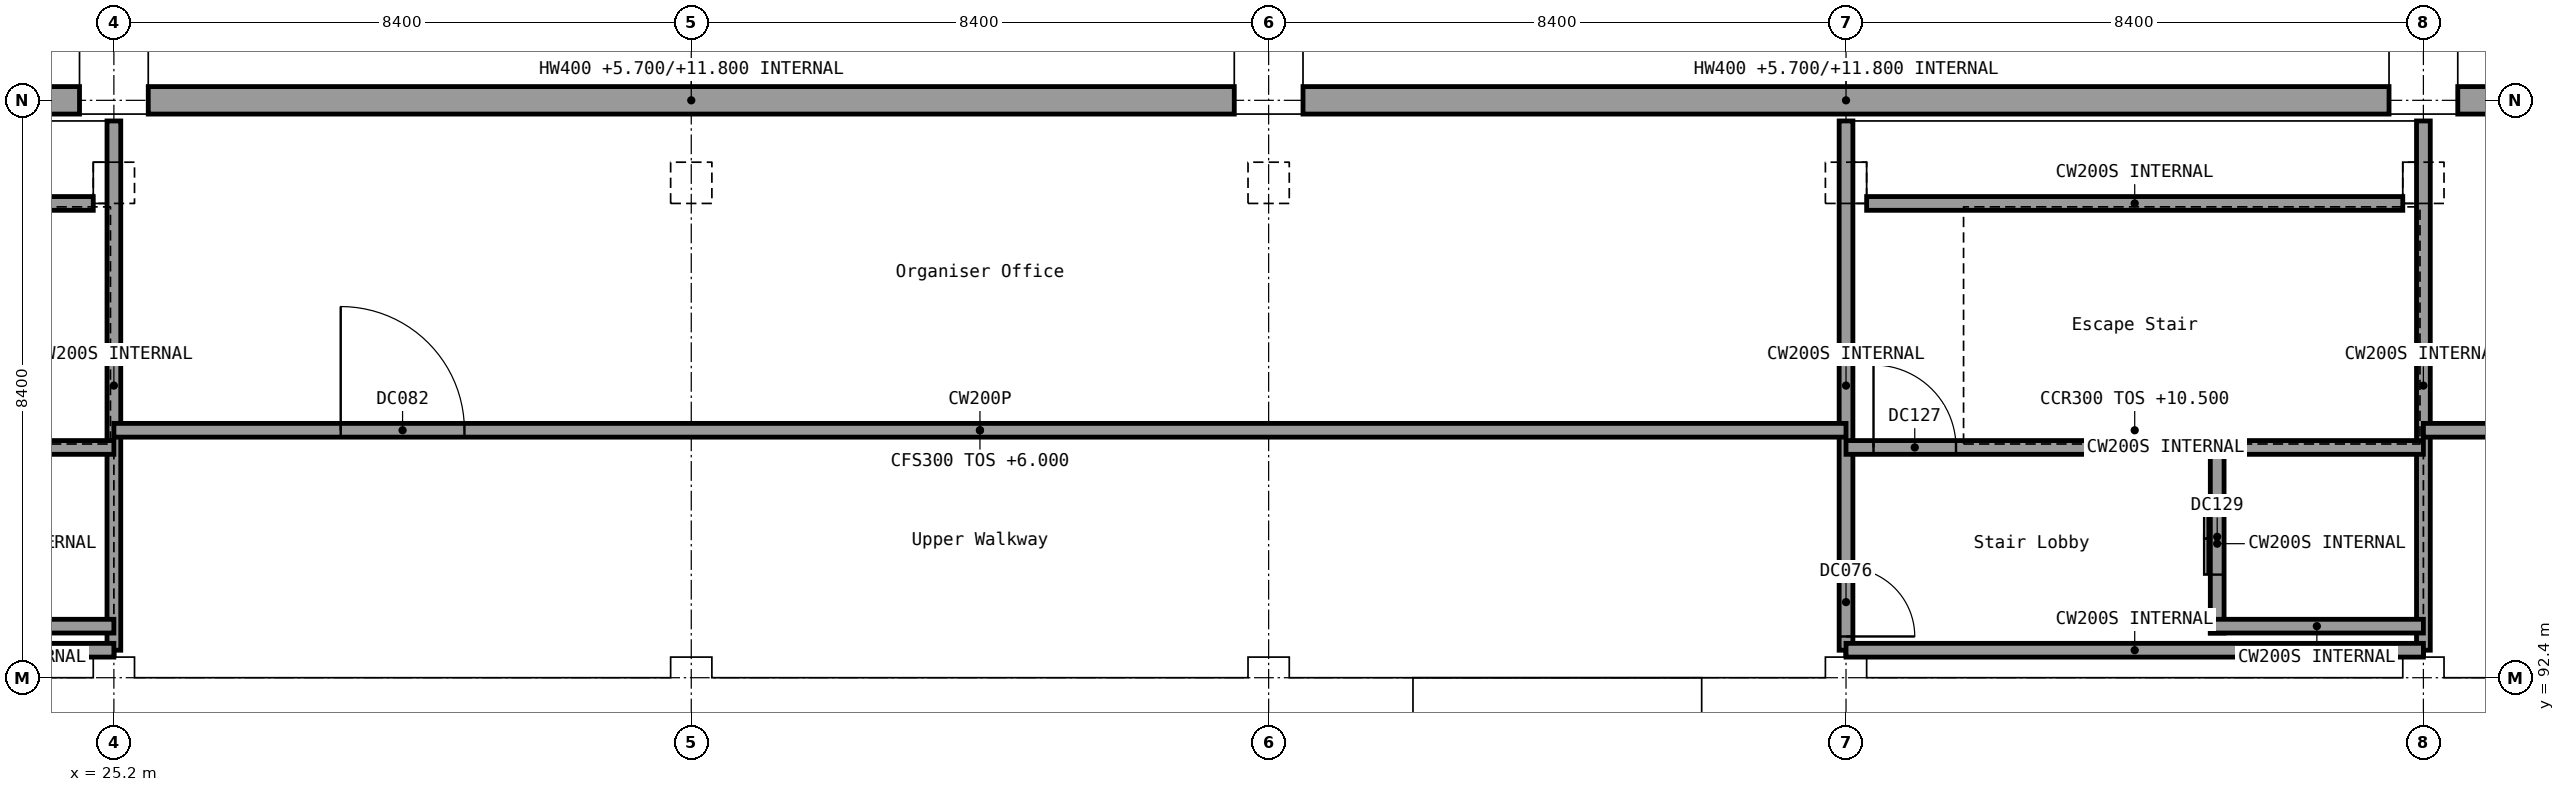
"""IFC4 building model, lengths in metres.
Left out: names, types, materials, properties, quantities, classifications, styles, units other than length and angle.
Written with IfcOpenShell. Run it as: python <this file> out.ifc"""

import sys

from ifc_helpers import new_model, si_unit, direction, frame, frame_2d, origin, origin_2d, place, context, subcontext, project, spatial, rectangle, extrude, element, fill, save


model = new_model("IFC4")
c1 = context("Model", 3, precision=1e-05, world=origin(), true_north=direction((0.0, 1.0)))
c2 = subcontext(c1, "Body", "Model", "MODEL_VIEW")
j1 = project(units=[si_unit("LENGTHUNIT", "METRE"), si_unit("PLANEANGLEUNIT", "RADIAN")], contexts=[c1])
p1 = place(None, origin())
s1 = spatial("IfcSite", under=j1, at=p1, CompositionType="ELEMENT")
p2 = place(p1, origin())
s2 = spatial("IfcBuilding", under=s1, at=p2, CompositionType="ELEMENT")
p3 = place(p2, frame((0.0, 0.0, 6.0)))
s3 = spatial("IfcBuildingStorey", under=s2, at=p3, CompositionType="ELEMENT", Elevation=6.0)
for number, where, z_axis, x_axis in (
    (1, (25.2, 100.8, 0.0), (0.0, 0.0, 1.0), (1.0, 0.0, 0.0)),
    (2, (42.0, 100.8, 0.0), (0.0, 0.0, 1.0), (1.0, 0.0, 0.0)),
    (3, (58.8, 100.8, 0.0), (0.0, 0.0, 1.0), (1.0, 0.0, 0.0)),
):
    element("IfcColumn", number, at=place(p3, frame(where, z_axis=z_axis, x_axis=x_axis)), inside=s3, PredefinedType="COLUMN", context=c2, shape_type="SweptSolid", body=[
        extrude(rectangle(XDim=1.0, YDim=1.6, at=origin_2d()), origin(), (0.0, 0.0, 1.0), 4.5),
    ])
for number, where, z_axis, x_axis in (
    (4, (8.9, 100.8, -0.3), (0.0, 0.0, 1.0), (1.0, 0.0, 0.0)),
    (5, (25.7, 100.8, -0.3), (0.0, 0.0, 1.0), (1.0, 0.0, 0.0)),
    (6, (42.5, 100.8, -0.3), (0.0, 0.0, 1.0), (1.0, 0.0, 0.0)),
    (7, (59.3, 100.8, -0.3), (0.0, 0.0, 1.0), (1.0, 0.0, 0.0)),
):
    element("IfcWall", number, at=place(p3, frame(where, z_axis=z_axis, x_axis=x_axis)), inside=s3, PredefinedType="STANDARD", context=c2, shape_type="SweptSolid", body=[
        extrude(rectangle(XDim=15.8, YDim=0.4, at=frame_2d((7.9, 0.0))), origin(), (0.0, 0.0, 1.0), 6.1),
    ])
for number, where, z_axis, x_axis in (
    (8, (25.2, 99.6, 0.0), (0.0, 0.0, 1.0), (1.0, 0.0, 0.0)),
    (9, (33.6, 99.6, 0.0), (0.0, 0.0, 1.0), (1.0, 0.0, 0.0)),
    (10, (42.0, 99.6, 0.0), (0.0, 0.0, 1.0), (1.0, 0.0, 0.0)),
    (11, (50.4, 99.6, 0.0), (0.0, 0.0, 1.0), (1.0, 0.0, 0.0)),
    (12, (58.8, 99.6, 0.0), (0.0, 0.0, 1.0), (1.0, 0.0, 0.0)),
):
    element("IfcColumn", number, at=place(p3, frame(where, z_axis=z_axis, x_axis=x_axis)), inside=s3, PredefinedType="COLUMN", context=c2, shape_type="SweptSolid", body=[
        extrude(rectangle(XDim=0.6, YDim=0.6, at=origin_2d()), origin(), (0.0, 0.0, 1.0), 4.5),
    ])
p4 = place(p3, frame((25.2, 100.5, 0.0), z_axis=(0.0, 0.0, 1.0), x_axis=(0.0, -1.0, 0.0)))
e13 = element("IfcWall", 13, at=p4, inside=s3, PredefinedType="SOLIDWALL", context=c2, shape_type="SweptSolid", body=[
    extrude(rectangle(XDim=7.7, YDim=0.2, at=frame_2d((3.85, 0.0))), origin(), (0.0, 0.0, 1.0), 4.2),
])
p5 = place(p3, frame((50.4, 100.5, 0.0), z_axis=(0.0, 0.0, 1.0), x_axis=(0.0, -1.0, 0.0)))
e14 = element("IfcWall", 14, at=p5, inside=s3, PredefinedType="SOLIDWALL", context=c2, shape_type="SweptSolid", body=[
    extrude(rectangle(XDim=7.7, YDim=0.2, at=frame_2d((3.85, 0.0))), origin(), (0.0, 0.0, 1.0), 4.2),
])
p6 = place(p5, frame((6.5, 0.0, 0.0)))
e15 = element("IfcOpeningElement", 15, at=p6, cuts=e14, PredefinedType="OPENING", context=c2, shape_type="SweptSolid", body=[
    extrude(rectangle(XDim=1.0, YDim=2.4, at=frame_2d((0.5, 1.2))), frame((0.0, 0.1, 0.0), z_axis=(0.0, -1.0, 0.0), x_axis=(1.0, 0.0, 0.0)), (0.0, 0.0, 1.0), 0.2),
])
p7 = place(p3, frame((58.8, 100.5, 0.0), z_axis=(0.0, 0.0, 1.0), x_axis=(0.0, -1.0, 0.0)))
e16 = element("IfcWall", 16, at=p7, inside=s3, PredefinedType="SOLIDWALL", context=c2, shape_type="SweptSolid", body=[
    extrude(rectangle(XDim=7.7, YDim=0.2, at=frame_2d((3.85, 0.0))), origin(), (0.0, 0.0, 1.0), 4.2),
])
p8 = place(p3, frame((25.2, 96.0, 0.0), z_axis=(0.0, 0.0, 1.0), x_axis=(1.0, 0.0, 0.0)))
e17 = element("IfcWall", 17, at=p8, inside=s3, PredefinedType="PARTITIONING", context=c2, shape_type="SweptSolid", body=[
    extrude(rectangle(XDim=25.2, YDim=0.2, at=frame_2d((12.6, 0.0))), origin(), (0.0, 0.0, 1.0), 4.5),
])
p9 = place(p8, frame((3.3, 0.0, 0.0)))
e18 = element("IfcOpeningElement", 18, at=p9, cuts=e17, PredefinedType="OPENING", context=c2, shape_type="SweptSolid", body=[
    extrude(rectangle(XDim=1.8, YDim=2.4, at=frame_2d((0.9, 1.2))), frame((0.0, 0.1, 0.0), z_axis=(0.0, -1.0, 0.0), x_axis=(1.0, 0.0, 0.0)), (0.0, 0.0, 1.0), 0.2),
])
p10 = place(p3, frame((58.8, 96.0, 0.0), z_axis=(0.0, 0.0, 1.0), x_axis=(1.0, 0.0, 0.0)))
e19 = element("IfcWall", 19, at=p10, inside=s3, PredefinedType="PARTITIONING", context=c2, shape_type="SweptSolid", body=[
    extrude(rectangle(XDim=16.8, YDim=0.2, at=frame_2d((8.4, 0.0))), origin(), (0.0, 0.0, 1.0), 4.5),
])
p11 = place(p10, frame((3.3, 0.0, 0.0)))
e20 = element("IfcOpeningElement", 20, at=p11, cuts=e19, PredefinedType="OPENING", context=c2, shape_type="SweptSolid", body=[
    extrude(rectangle(XDim=1.8, YDim=2.4, at=frame_2d((0.9, 1.2))), frame((0.0, 0.1, 0.0), z_axis=(0.0, -1.0, 0.0), x_axis=(1.0, 0.0, 0.0)), (0.0, 0.0, 1.0), 0.2),
])
p12 = place(p10, frame((14.8, 0.0, 0.0)))
e21 = element("IfcOpeningElement", 21, at=p12, cuts=e19, PredefinedType="OPENING", context=c2, shape_type="SweptSolid", body=[
    extrude(rectangle(XDim=1.0, YDim=2.4, at=frame_2d((0.5, 1.2))), frame((0.0, 0.1, 0.0), z_axis=(0.0, -1.0, 0.0), x_axis=(1.0, 0.0, 0.0)), (0.0, 0.0, 1.0), 0.2),
])
p13 = place(p3, frame((16.8, 92.8, 0.0), z_axis=(0.0, 0.0, 1.0), x_axis=(1.0, 0.0, 0.0)))
e22 = element("IfcWall", 22, at=p13, inside=s3, PredefinedType="SOLIDWALL", context=c2, shape_type="SweptSolid", body=[
    extrude(rectangle(XDim=8.4, YDim=0.2, at=frame_2d((4.2, 0.0))), origin(), (0.0, 0.0, 1.0), 4.2),
])
p14 = place(p3, frame((50.4, 92.8, 0.0), z_axis=(0.0, 0.0, 1.0), x_axis=(1.0, 0.0, 0.0)))
e23 = element("IfcWall", 23, at=p14, inside=s3, PredefinedType="SOLIDWALL", context=c2, shape_type="SweptSolid", body=[
    extrude(rectangle(XDim=8.4, YDim=0.2, at=frame_2d((4.2, 0.0))), origin(), (0.0, 0.0, 1.0), 4.2),
])
p15 = place(p3, frame((17.1, 99.3, 0.0), z_axis=(0.0, 0.0, 1.0), x_axis=(1.0, 0.0, 0.0)))
e24 = element("IfcWall", 24, at=p15, inside=s3, PredefinedType="SOLIDWALL", context=c2, shape_type="SweptSolid", body=[
    extrude(rectangle(XDim=7.8, YDim=0.2, at=frame_2d((3.9, 0.0))), origin(), (0.0, 0.0, 1.0), 4.2),
])
p16 = place(p3, frame((16.8, 95.75, 0.0), z_axis=(0.0, 0.0, 1.0), x_axis=(1.0, 0.0, 0.0)))
e25 = element("IfcWall", 25, at=p16, inside=s3, PredefinedType="SOLIDWALL", context=c2, shape_type="SweptSolid", body=[
    extrude(rectangle(XDim=8.4, YDim=0.2, at=frame_2d((4.2, 0.0))), origin(), (0.0, 0.0, 1.0), 4.2),
])
p17 = place(p16, frame((0.4, 0.0, 0.0)))
e26 = element("IfcOpeningElement", 26, at=p17, cuts=e25, PredefinedType="OPENING", context=c2, shape_type="SweptSolid", body=[
    extrude(rectangle(XDim=1.2, YDim=2.4, at=frame_2d((0.6, 1.2))), frame((0.0, 0.1, 0.0), z_axis=(0.0, -1.0, 0.0), x_axis=(1.0, 0.0, 0.0)), (0.0, 0.0, 1.0), 0.2),
])
p18 = place(p3, frame((22.1, 93.15, 0.0), z_axis=(0.0, 0.0, 1.0), x_axis=(1.0, 0.0, 0.0)))
e27 = element("IfcWall", 27, at=p18, inside=s3, PredefinedType="SOLIDWALL", context=c2, shape_type="SweptSolid", body=[
    extrude(rectangle(XDim=3.1, YDim=0.2, at=frame_2d((1.55, 0.0))), origin(), (0.0, 0.0, 1.0), 4.2),
])
p19 = place(p3, frame((50.7, 99.3, 0.0), z_axis=(0.0, 0.0, 1.0), x_axis=(1.0, 0.0, 0.0)))
e28 = element("IfcWall", 28, at=p19, inside=s3, PredefinedType="SOLIDWALL", context=c2, shape_type="SweptSolid", body=[
    extrude(rectangle(XDim=7.8, YDim=0.2, at=frame_2d((3.9, 0.0))), origin(), (0.0, 0.0, 1.0), 4.2),
])
p20 = place(p3, frame((50.4, 95.75, 0.0), z_axis=(0.0, 0.0, 1.0), x_axis=(1.0, 0.0, 0.0)))
e29 = element("IfcWall", 29, at=p20, inside=s3, PredefinedType="SOLIDWALL", context=c2, shape_type="SweptSolid", body=[
    extrude(rectangle(XDim=8.4, YDim=0.2, at=frame_2d((4.2, 0.0))), origin(), (0.0, 0.0, 1.0), 4.2),
])
p21 = place(p20, frame((0.4, 0.0, 0.0)))
e30 = element("IfcOpeningElement", 30, at=p21, cuts=e29, PredefinedType="OPENING", context=c2, shape_type="SweptSolid", body=[
    extrude(rectangle(XDim=1.2, YDim=2.4, at=frame_2d((0.6, 1.2))), frame((0.0, 0.1, 0.0), z_axis=(0.0, -1.0, 0.0), x_axis=(1.0, 0.0, 0.0)), (0.0, 0.0, 1.0), 0.2),
])
p22 = place(p3, frame((55.8, 93.05, 0.0), z_axis=(0.0, 0.0, 1.0), x_axis=(0.0, 1.0, 0.0)))
e31 = element("IfcWall", 31, at=p22, inside=s3, PredefinedType="SOLIDWALL", context=c2, shape_type="SweptSolid", body=[
    extrude(rectangle(XDim=2.6, YDim=0.2, at=frame_2d((1.3, 0.0))), origin(), (0.0, 0.0, 1.0), 4.2),
])
p23 = place(p22, frame((0.85, 0.0, 0.0)))
e32 = element("IfcOpeningElement", 32, at=p23, cuts=e31, PredefinedType="OPENING", context=c2, shape_type="SweptSolid", body=[
    extrude(rectangle(XDim=1.1, YDim=2.1, at=frame_2d((0.55, 1.05))), frame((0.0, 0.1, 0.0), z_axis=(0.0, -1.0, 0.0), x_axis=(1.0, 0.0, 0.0)), (0.0, 0.0, 1.0), 0.2),
])
p24 = place(p3, frame((55.7, 93.15, 0.0), z_axis=(0.0, 0.0, 1.0), x_axis=(1.0, 0.0, 0.0)))
e33 = element("IfcWall", 33, at=p24, inside=s3, PredefinedType="SOLIDWALL", context=c2, shape_type="SweptSolid", body=[
    extrude(rectangle(XDim=3.1, YDim=0.2, at=frame_2d((1.55, 0.0))), origin(), (0.0, 0.0, 1.0), 4.2),
])
p25 = place(p6, origin())
e34 = element("IfcDoor", 34, at=p25, inside=s3, OperationType="SINGLE_SWING_RIGHT", PredefinedType="DOOR", context=c2, shape_type="SweptSolid", body=[
    extrude(rectangle(XDim=1.0, YDim=2.4, at=frame_2d((0.5, 1.2))), frame((0.0, 0.025, 0.0), z_axis=(0.0, -1.0, 0.0), x_axis=(1.0, 0.0, 0.0)), (0.0, 0.0, 1.0), 0.05),
])
fill(e15, e34)
p26 = place(p9, origin())
e35 = element("IfcDoor", 35, at=p26, inside=s3, OperationType="DOUBLE_DOOR_DOUBLE_SWING", PredefinedType="DOOR", context=c2, shape_type="SweptSolid", body=[
    extrude(rectangle(XDim=1.8, YDim=2.4, at=frame_2d((0.9, 1.2))), frame((0.0, 0.025, 0.0), z_axis=(0.0, -1.0, 0.0), x_axis=(1.0, 0.0, 0.0)), (0.0, 0.0, 1.0), 0.05),
])
fill(e18, e35)
p27 = place(p21, origin())
e36 = element("IfcDoor", 36, at=p27, inside=s3, OperationType="SINGLE_SWING_LEFT", PredefinedType="DOOR", context=c2, shape_type="SweptSolid", body=[
    extrude(rectangle(XDim=1.2, YDim=2.4, at=frame_2d((0.6, 1.2))), frame((0.0, 0.025, 0.0), z_axis=(0.0, -1.0, 0.0), x_axis=(1.0, 0.0, 0.0)), (0.0, 0.0, 1.0), 0.05),
])
fill(e30, e36)
p28 = place(p23, origin())
e37 = element("IfcDoor", 37, at=p28, inside=s3, OperationType="DOUBLE_DOOR_SLIDING", PredefinedType="DOOR", context=c2, shape_type="SweptSolid", body=[
    extrude(rectangle(XDim=1.1, YDim=2.1, at=frame_2d((0.55, 1.05))), frame((0.0, 0.025, 0.0), z_axis=(0.0, -1.0, 0.0), x_axis=(1.0, 0.0, 0.0)), (0.0, 0.0, 1.0), 0.05),
])
fill(e32, e37)
save(model, sys.argv[1])
